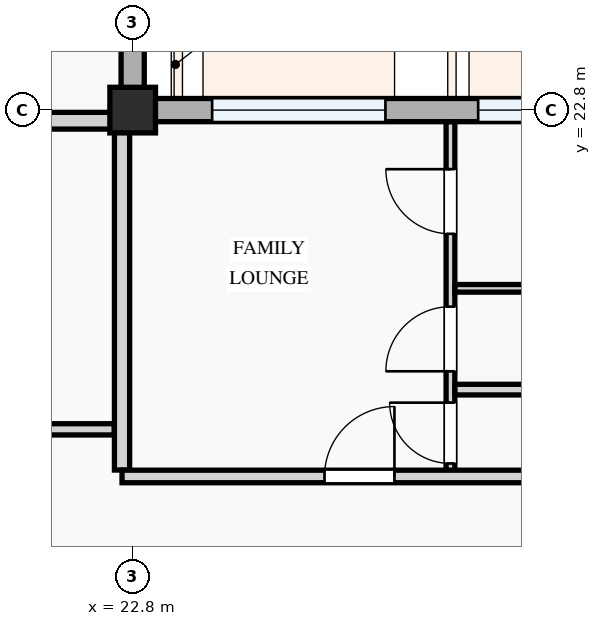
"""IFC4 building model, lengths in metres.
Left out: names, types, materials, properties, quantities, classifications, styles, units other than length and angle.
Written with IfcOpenShell. Run it as: python <this file> out.ifc"""

import sys

from ifc_helpers import new_model, si_unit, direction, frame, frame_2d, origin, origin_2d, place, context, subcontext, project, spatial, rectangle, extrude, element, fill, save


model = new_model("IFC4")
c1 = context("Model", 3, precision=1e-05, world=origin(), true_north=direction((0.0, 1.0)))
c2 = subcontext(c1, "Body", "Model", "MODEL_VIEW")
j1 = project(units=[si_unit("LENGTHUNIT", "METRE"), si_unit("PLANEANGLEUNIT", "RADIAN")], contexts=[c1])
p1 = place(None, origin())
s1 = spatial("IfcSite", under=j1, at=p1, CompositionType="ELEMENT")
p2 = place(p1, origin())
s2 = spatial("IfcBuilding", under=s1, at=p2, CompositionType="ELEMENT")
p3 = place(p2, frame((0.0, 0.0, 18.0)))
s3 = spatial("IfcBuildingStorey", under=s2, at=p3, CompositionType="ELEMENT", Elevation=18.0)
p4 = place(p3, frame((22.8, 22.8, 0.0), z_axis=(0.0, 0.0, 1.0), x_axis=(1.0, 0.0, 0.0)))
e1 = element("IfcColumn", 1, at=p4, inside=s3, PredefinedType="COLUMN", context=c2, shape_type="SweptSolid", body=[
    extrude(rectangle(XDim=0.6, YDim=0.6, at=origin_2d()), origin(), (0.0, 0.0, 1.0), 3.3),
])
p5 = place(p3, frame((22.8, 22.8, 0.0), z_axis=(0.0, 0.0, 1.0), x_axis=(0.0, 1.0, 0.0)))
e2 = element("IfcWall", 2, at=p5, inside=s3, PredefinedType="STANDARD", context=c2, shape_type="SweptSolid", body=[
    extrude(rectangle(XDim=6.0, YDim=0.305, at=frame_2d((3.0, 0.0))), origin(), (0.0, 0.0, 1.0), 2.575),
])
p6 = place(p5, frame((1.685, 0.0, 0.78)))
e3 = element("IfcOpeningElement", 3, at=p6, cuts=e2, PredefinedType="OPENING", context=c2, shape_type="SweptSolid", body=[
    extrude(rectangle(XDim=1.0, YDim=1.25, at=frame_2d((0.5, 0.625))), frame((0.0, 0.163, 0.0), z_axis=(0.0, -1.0, 0.0), x_axis=(1.0, 0.0, 0.0)), (0.0, 0.0, 1.0), 0.325),
])
p7 = place(p5, frame((4.521, 0.0, 0.78)))
e4 = element("IfcOpeningElement", 4, at=p7, cuts=e2, PredefinedType="OPENING", context=c2, shape_type="SweptSolid", body=[
    extrude(rectangle(XDim=0.95, YDim=1.15, at=frame_2d((0.475, 0.575))), frame((0.0, 0.163, 0.0), z_axis=(0.0, -1.0, 0.0), x_axis=(1.0, 0.0, 0.0)), (0.0, 0.0, 1.0), 0.325),
])
p8 = place(p3, frame((28.8, 22.8, 0.0), z_axis=(0.0, 0.0, 1.0), x_axis=(-1.0, 0.0, 0.0)))
e5 = element("IfcWall", 5, at=p8, inside=s3, PredefinedType="STANDARD", context=c2, shape_type="SweptSolid", body=[
    extrude(rectangle(XDim=6.0, YDim=0.305, at=frame_2d((3.0, 0.0))), origin(), (0.0, 0.0, 1.0), 2.475),
])
p9 = place(p8, frame((0.555, 0.0, 0.78)))
e6 = element("IfcOpeningElement", 6, at=p9, cuts=e5, PredefinedType="OPENING", context=c2, shape_type="SweptSolid", body=[
    extrude(rectangle(XDim=0.9, YDim=1.2, at=frame_2d((0.45, 0.6))), frame((0.0, 0.163, 0.0), z_axis=(0.0, -1.0, 0.0), x_axis=(1.0, 0.0, 0.0)), (0.0, 0.0, 1.0), 0.325),
])
p10 = place(p8, frame((2.675, 0.0, 0.78)))
e7 = element("IfcOpeningElement", 7, at=p10, cuts=e5, PredefinedType="OPENING", context=c2, shape_type="SweptSolid", body=[
    extrude(rectangle(XDim=2.28, YDim=1.46, at=frame_2d((1.14, 0.73))), frame((0.0, 0.163, 0.0), z_axis=(0.0, -1.0, 0.0), x_axis=(1.0, 0.0, 0.0)), (0.0, 0.0, 1.0), 0.325),
])
p11 = place(p3, frame((18.025, 18.6, 0.0), z_axis=(0.0, 0.0, 1.0), x_axis=(1.0, 0.0, 0.0)))
e8 = element("IfcWall", 8, at=p11, inside=s3, PredefinedType="PARTITIONING", context=c2, shape_type="SweptSolid", body=[
    extrude(rectangle(XDim=4.533, YDim=0.148, at=frame_2d((2.267, 0.0))), origin(), (0.0, 0.0, 1.0), 3.0),
])
p12 = place(p11, frame((1.65, 0.0, 0.0)))
e9 = element("IfcOpeningElement", 9, at=p12, cuts=e8, PredefinedType="OPENING", context=c2, shape_type="SweptSolid", body=[
    extrude(rectangle(XDim=1.0, YDim=2.15, at=frame_2d((0.5, 1.075))), frame((0.0, 0.084, 0.0), z_axis=(0.0, -1.0, 0.0), x_axis=(1.0, 0.0, 0.0)), (0.0, 0.0, 1.0), 0.168),
])
p13 = place(p3, frame((18.064, 22.66, 0.0), z_axis=(0.0, 0.0, 1.0), x_axis=(1.0, 0.0, 0.0)))
e10 = element("IfcWall", 10, at=p13, inside=s3, PredefinedType="PARTITIONING", context=c2, shape_type="SweptSolid", body=[
    extrude(rectangle(XDim=4.494, YDim=0.22, at=frame_2d((2.247, 0.0))), origin(), (0.0, 0.0, 1.0), 2.375),
])
p14 = place(p3, frame((26.981, 17.98, 0.0), z_axis=(0.0, 0.0, 1.0), x_axis=(0.0, 1.0, 0.0)))
e11 = element("IfcWall", 11, at=p14, inside=s3, PredefinedType="PARTITIONING", context=c2, shape_type="SweptSolid", body=[
    extrude(rectangle(XDim=4.666, YDim=0.115, at=frame_2d((2.333, 0.0))), origin(), (0.0, 0.0, 1.0), 3.0),
])
p15 = place(p14, frame((0.171, 0.0, 0.0)))
e12 = element("IfcOpeningElement", 12, at=p15, cuts=e11, PredefinedType="OPENING", context=c2, shape_type="SweptSolid", body=[
    extrude(rectangle(XDim=0.8, YDim=2.1, at=frame_2d((0.4, 1.05))), frame((0.0, 0.067, 0.0), z_axis=(0.0, -1.0, 0.0), x_axis=(1.0, 0.0, 0.0)), (0.0, 0.0, 1.0), 0.135),
])
p16 = place(p14, frame((1.384, 0.0, 0.0)))
e13 = element("IfcOpeningElement", 13, at=p16, cuts=e11, PredefinedType="OPENING", context=c2, shape_type="SweptSolid", body=[
    extrude(rectangle(XDim=0.85, YDim=2.1, at=frame_2d((0.425, 1.05))), frame((0.0, 0.067, 0.0), z_axis=(0.0, -1.0, 0.0), x_axis=(1.0, 0.0, 0.0)), (0.0, 0.0, 1.0), 0.135),
])
p17 = place(p14, frame((3.193, 0.0, 0.0)))
e14 = element("IfcOpeningElement", 14, at=p17, cuts=e11, PredefinedType="OPENING", context=c2, shape_type="SweptSolid", body=[
    extrude(rectangle(XDim=0.85, YDim=2.1, at=frame_2d((0.425, 1.05))), frame((0.0, 0.067, 0.0), z_axis=(0.0, -1.0, 0.0), x_axis=(1.0, 0.0, 0.0)), (0.0, 0.0, 1.0), 0.135),
])
p18 = place(p3, frame((27.04, 20.455, 0.0), z_axis=(0.0, 0.0, 1.0), x_axis=(1.0, 0.0, 0.0)))
e15 = element("IfcWall", 15, at=p18, inside=s3, PredefinedType="PARTITIONING", context=c2, shape_type="SweptSolid", body=[
    extrude(rectangle(XDim=5.985, YDim=0.1, at=frame_2d((2.993, 0.0))), origin(), (0.0, 0.0, 1.0), 3.0),
])
p19 = place(p3, frame((27.04, 19.122, 0.0), z_axis=(0.0, 0.0, 1.0), x_axis=(1.0, 0.0, 0.0)))
e16 = element("IfcWall", 16, at=p19, inside=s3, PredefinedType="PARTITIONING", context=c2, shape_type="SweptSolid", body=[
    extrude(rectangle(XDim=5.985, YDim=0.14, at=frame_2d((2.993, 0.0))), origin(), (0.0, 0.0, 1.0), 3.0),
])
p20 = place(p3, frame((22.66, 18.064, 0.0), z_axis=(0.0, 0.0, 1.0), x_axis=(0.0, 1.0, 0.0)))
e17 = element("IfcWall", 17, at=p20, inside=s3, PredefinedType="PARTITIONING", context=c2, shape_type="SweptSolid", body=[
    extrude(rectangle(XDim=4.676, YDim=0.2, at=frame_2d((2.338, 0.0))), origin(), (0.0, 0.0, 1.0), 2.425),
])
p21 = place(p3, frame((22.66, 17.98, 0.0), z_axis=(0.0, 0.0, 1.0), x_axis=(1.0, 0.0, 0.0)))
e18 = element("IfcWall", 18, at=p21, inside=s3, PredefinedType="PARTITIONING", context=c2, shape_type="SweptSolid", body=[
    extrude(rectangle(XDim=34.88, YDim=0.165, at=frame_2d((17.44, 0.0))), origin(), (0.0, 0.0, 1.0), 3.0),
])
p22 = place(p21, frame((2.664, 0.0, 0.0)))
e19 = element("IfcOpeningElement", 19, at=p22, cuts=e18, PredefinedType="OPENING", context=c2, shape_type="SweptSolid", body=[
    extrude(rectangle(XDim=0.92, YDim=2.1, at=frame_2d((0.46, 1.05))), frame((0.0, 0.093, 0.0), z_axis=(0.0, -1.0, 0.0), x_axis=(1.0, 0.0, 0.0)), (0.0, 0.0, 1.0), 0.185),
])
p23 = place(p21, frame((10.71, 0.0, 0.0)))
e20 = element("IfcOpeningElement", 20, at=p23, cuts=e18, PredefinedType="OPENING", context=c2, shape_type="SweptSolid", body=[
    extrude(rectangle(XDim=0.92, YDim=2.1, at=frame_2d((0.46, 1.05))), frame((0.0, 0.093, 0.0), z_axis=(0.0, -1.0, 0.0), x_axis=(1.0, 0.0, 0.0)), (0.0, 0.0, 1.0), 0.185),
])
p24 = place(p21, frame((24.254, 0.0, 0.0)))
e21 = element("IfcOpeningElement", 21, at=p24, cuts=e18, PredefinedType="OPENING", context=c2, shape_type="SweptSolid", body=[
    extrude(rectangle(XDim=0.92, YDim=2.1, at=frame_2d((0.46, 1.05))), frame((0.0, 0.093, 0.0), z_axis=(0.0, -1.0, 0.0), x_axis=(1.0, 0.0, 0.0)), (0.0, 0.0, 1.0), 0.185),
])
p25 = place(p9, origin())
e22 = element("IfcWindow", 22, at=p25, inside=s3, PartitioningType="SINGLE_PANEL", PredefinedType="WINDOW", context=c2, shape_type="SweptSolid", body=[
    extrude(rectangle(XDim=0.9, YDim=1.2, at=frame_2d((0.45, 0.6))), frame((0.0, 0.03, 0.0), z_axis=(0.0, -1.0, 0.0), x_axis=(1.0, 0.0, 0.0)), (0.0, 0.0, 1.0), 0.06),
])
fill(e6, e22)
p26 = place(p10, origin())
e23 = element("IfcWindow", 23, at=p26, inside=s3, PartitioningType="DOUBLE_PANEL_VERTICAL", PredefinedType="WINDOW", context=c2, shape_type="SweptSolid", body=[
    extrude(rectangle(XDim=2.28, YDim=1.46, at=frame_2d((1.14, 0.73))), frame((0.0, 0.03, 0.0), z_axis=(0.0, -1.0, 0.0), x_axis=(1.0, 0.0, 0.0)), (0.0, 0.0, 1.0), 0.06),
])
fill(e7, e23)
p27 = place(p15, origin())
e24 = element("IfcDoor", 24, at=p27, inside=s3, OperationType="SINGLE_SWING_RIGHT", PredefinedType="DOOR", context=c2, shape_type="SweptSolid", body=[
    extrude(rectangle(XDim=0.8, YDim=2.1, at=frame_2d((0.4, 1.05))), frame((0.0, 0.025, 0.0), z_axis=(0.0, -1.0, 0.0), x_axis=(1.0, 0.0, 0.0)), (0.0, 0.0, 1.0), 0.05),
])
fill(e12, e24)
p28 = place(p16, origin())
e25 = element("IfcDoor", 25, at=p28, inside=s3, OperationType="SINGLE_SWING_LEFT", PredefinedType="DOOR", context=c2, shape_type="SweptSolid", body=[
    extrude(rectangle(XDim=0.85, YDim=2.1, at=frame_2d((0.425, 1.05))), frame((0.0, 0.025, 0.0), z_axis=(0.0, -1.0, 0.0), x_axis=(1.0, 0.0, 0.0)), (0.0, 0.0, 1.0), 0.05),
])
fill(e13, e25)
p29 = place(p17, origin())
e26 = element("IfcDoor", 26, at=p29, inside=s3, OperationType="SINGLE_SWING_RIGHT", PredefinedType="DOOR", context=c2, shape_type="SweptSolid", body=[
    extrude(rectangle(XDim=0.85, YDim=2.1, at=frame_2d((0.425, 1.05))), frame((0.0, 0.025, 0.0), z_axis=(0.0, -1.0, 0.0), x_axis=(1.0, 0.0, 0.0)), (0.0, 0.0, 1.0), 0.05),
])
fill(e14, e26)
p30 = place(p22, origin())
e27 = element("IfcDoor", 27, at=p30, inside=s3, OperationType="SINGLE_SWING_RIGHT", PredefinedType="DOOR", context=c2, shape_type="SweptSolid", body=[
    extrude(rectangle(XDim=0.92, YDim=2.1, at=frame_2d((0.46, 1.05))), frame((0.0, 0.025, 0.0), z_axis=(0.0, -1.0, 0.0), x_axis=(1.0, 0.0, 0.0)), (0.0, 0.0, 1.0), 0.05),
])
fill(e19, e27)
save(model, sys.argv[1])
